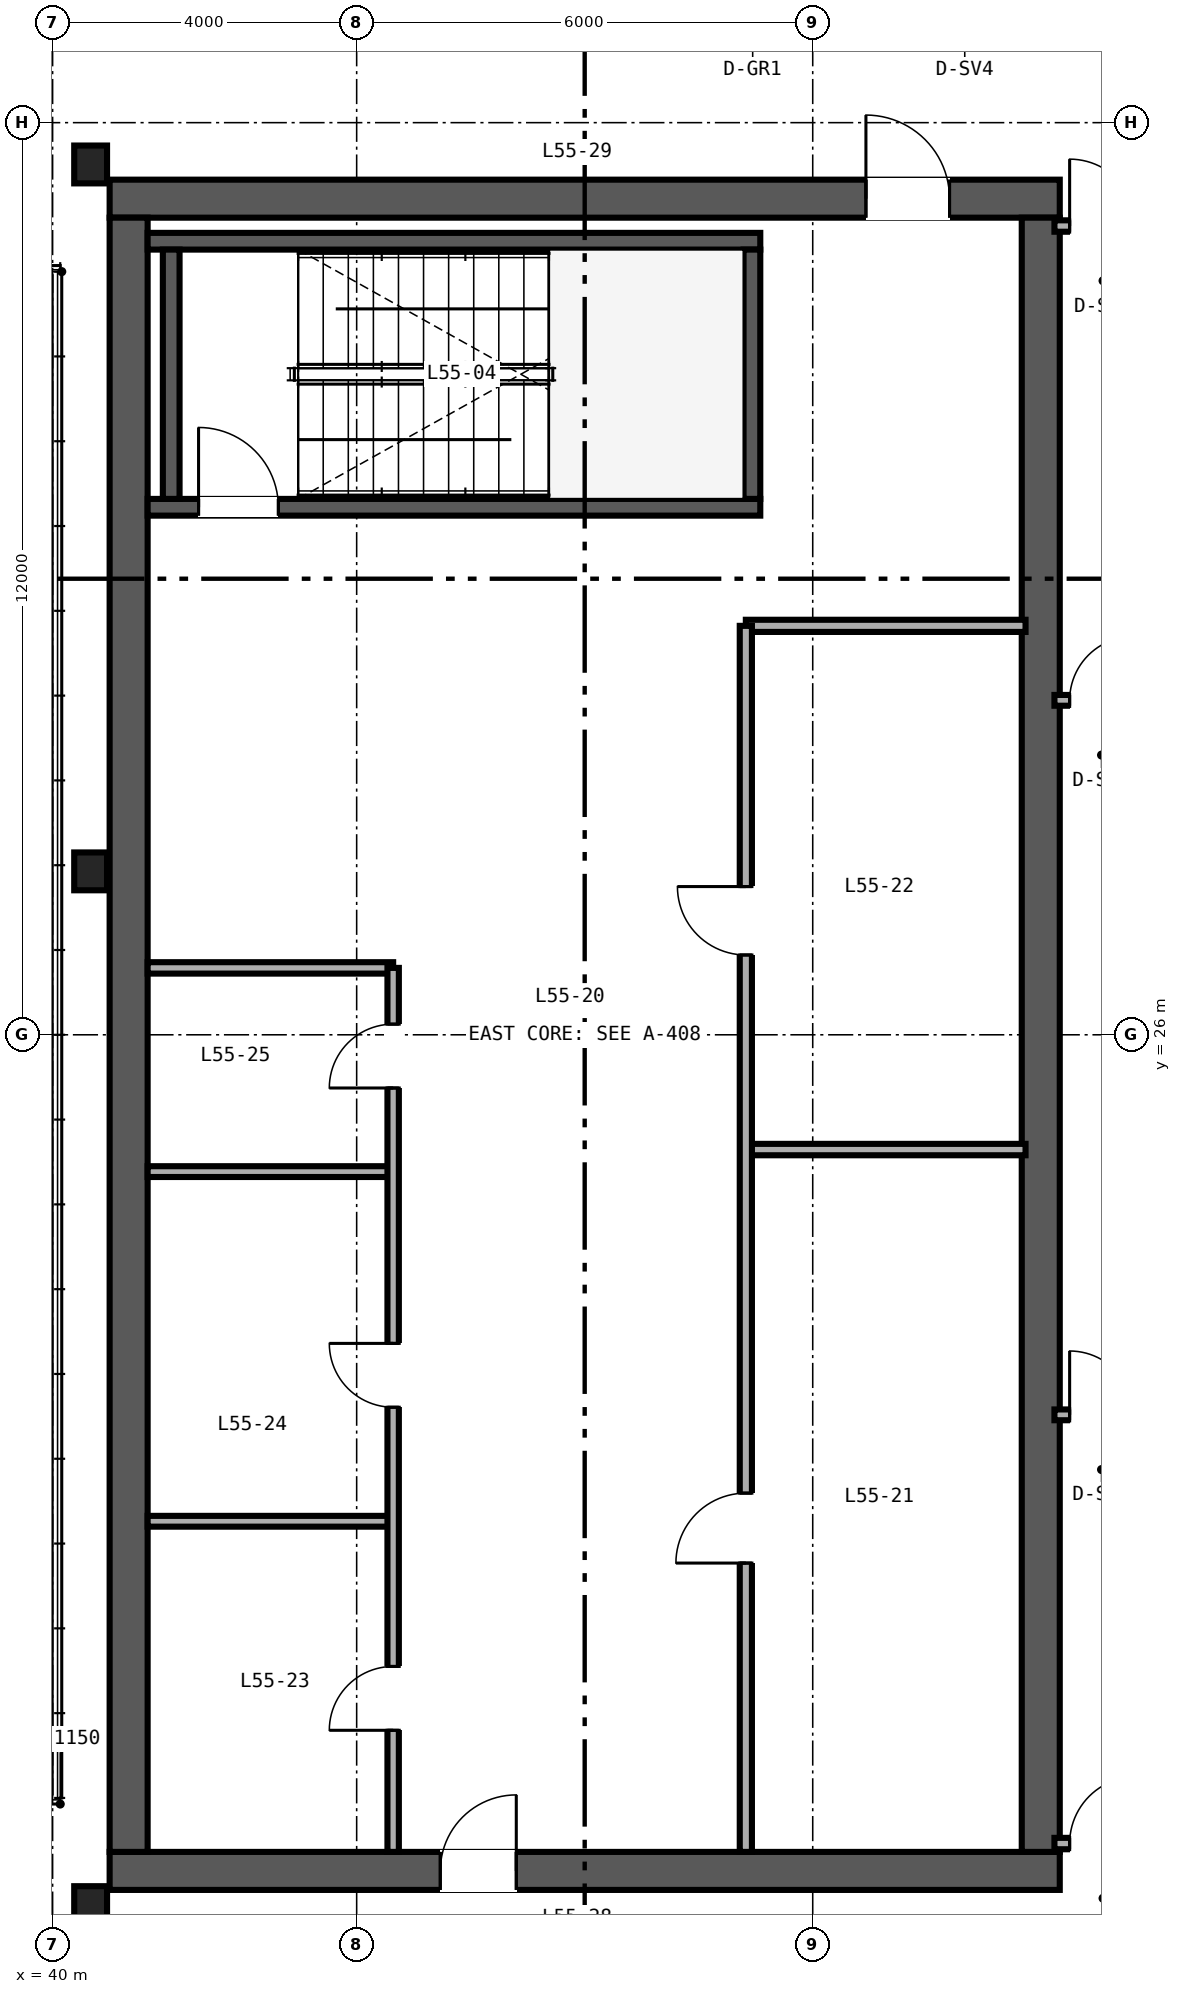
"""IFC4 building model, lengths in metres.
Left out: names, types, materials, properties, quantities, classifications, styles, units other than length and angle.
Written with IfcOpenShell. Run it as: python <this file> out.ifc"""

import sys

from ifc_helpers import new_model, si_unit, direction, frame, frame_2d, origin, origin_2d, place, context, subcontext, project, spatial, rectangle, i_section, extrude, source, transform, mapped, element, fill, save


model = new_model("IFC4")
c1 = context("Model", 3, precision=1e-05, world=origin(), true_north=direction((0.0, 1.0)))
c2 = subcontext(c1, "Body", "Model", "MODEL_VIEW")
j1 = project(units=[si_unit("LENGTHUNIT", "METRE"), si_unit("PLANEANGLEUNIT", "RADIAN")], contexts=[c1])
p1 = place(None, origin())
s1 = spatial("IfcSite", under=j1, at=p1, CompositionType="ELEMENT")
p2 = place(p1, origin())
s2 = spatial("IfcBuilding", under=s1, at=p2, CompositionType="ELEMENT")
p3 = place(p2, frame((0.0, 0.0, 217.2)))
s3 = spatial("IfcBuildingStorey", under=s2, at=p3, CompositionType="ELEMENT", Elevation=217.2)
p4 = place(p3, frame((40.75, 15.0, 0.0), z_axis=(0.0, 0.0, 1.0), x_axis=(1.0, 0.0, 0.0)))
e1 = element("IfcWall", 1, at=p4, inside=s3, PredefinedType="SHEAR", context=c2, shape_type="SweptSolid", body=[
    extrude(rectangle(XDim=12.5, YDim=0.5, at=frame_2d((6.25, 0.0))), origin(), (0.0, 0.0, 1.0), 3.28),
])
p5 = place(p4, frame((4.35, 0.0, 0.0)))
e2 = element("IfcOpeningElement", 2, at=p5, cuts=e1, PredefinedType="OPENING", context=c2, shape_type="SweptSolid", body=[
    extrude(rectangle(XDim=1.0, YDim=2.15, at=frame_2d((0.5, 1.075))), frame((0.0, 0.26, 0.0), z_axis=(0.0, -1.0, 0.0), x_axis=(1.0, 0.0, 0.0)), (0.0, 0.0, 1.0), 0.52),
])
p6 = place(p3, frame((40.75, 37.0, 0.0), z_axis=(0.0, 0.0, 1.0), x_axis=(1.0, 0.0, 0.0)))
e3 = element("IfcWall", 3, at=p6, inside=s3, PredefinedType="SHEAR", context=c2, shape_type="SweptSolid", body=[
    extrude(rectangle(XDim=12.5, YDim=0.5, at=frame_2d((6.25, 0.0))), origin(), (0.0, 0.0, 1.0), 3.28),
])
p7 = place(p6, frame((9.95, 0.0, 0.0)))
e4 = element("IfcOpeningElement", 4, at=p7, cuts=e3, PredefinedType="OPENING", context=c2, shape_type="SweptSolid", body=[
    extrude(rectangle(XDim=1.1, YDim=2.15, at=frame_2d((0.55, 1.075))), frame((0.0, 0.26, 0.0), z_axis=(0.0, -1.0, 0.0), x_axis=(1.0, 0.0, 0.0)), (0.0, 0.0, 1.0), 0.52),
])
for number, where, z_axis, x_axis in (
    (5, (41.0, 15.25, 0.0), (0.0, 0.0, 1.0), (0.0, 1.0, 0.0)),
    (6, (53.0, 15.25, 0.0), (0.0, 0.0, 1.0), (0.0, 1.0, 0.0)),
):
    element("IfcWall", number, at=place(p3, frame(where, z_axis=z_axis, x_axis=x_axis)), inside=s3, PredefinedType="SHEAR", context=c2, shape_type="SweptSolid", body=[
        extrude(rectangle(XDim=21.5, YDim=0.5, at=frame_2d((10.75, 0.0))), origin(), (0.0, 0.0, 1.0), 3.28),
    ])
p8 = place(p3, frame((41.25, 32.94, 0.0), z_axis=(0.0, 0.0, 1.0), x_axis=(1.0, 0.0, 0.0)))
e7 = element("IfcWall", 7, at=p8, inside=s3, PredefinedType="SHEAR", context=c2, shape_type="SweptSolid", body=[
    extrude(rectangle(XDim=8.06, YDim=0.22, at=frame_2d((4.03, 0.0))), origin(), (0.0, 0.0, 1.0), 3.4),
])
p9 = place(p8, frame((0.67, 0.0, 0.0)))
e8 = element("IfcOpeningElement", 8, at=p9, cuts=e7, PredefinedType="OPENING", context=c2, shape_type="SweptSolid", body=[
    extrude(rectangle(XDim=1.05, YDim=2.15, at=frame_2d((0.525, 1.075))), frame((0.0, 0.12, 0.0), z_axis=(0.0, -1.0, 0.0), x_axis=(1.0, 0.0, 0.0)), (0.0, 0.0, 1.0), 0.24),
])
p10 = place(p3, frame((41.25, 36.44, 0.0), z_axis=(0.0, 0.0, 1.0), x_axis=(1.0, 0.0, 0.0)))
e9 = element("IfcWall", 9, at=p10, inside=s3, PredefinedType="SHEAR", context=c2, shape_type="SweptSolid", body=[
    extrude(rectangle(XDim=8.06, YDim=0.22, at=frame_2d((4.03, 0.0))), origin(), (0.0, 0.0, 1.0), 3.4),
])
for number, where, z_axis, x_axis in (
    (10, (41.56, 33.05, 0.0), (0.0, 0.0, 1.0), (0.0, 1.0, 0.0)),
    (11, (49.2, 33.05, 0.0), (0.0, 0.0, 1.0), (0.0, 1.0, 0.0)),
):
    element("IfcWall", number, at=place(p3, frame(where, z_axis=z_axis, x_axis=x_axis)), inside=s3, PredefinedType="SHEAR", context=c2, shape_type="SweptSolid", body=[
        extrude(rectangle(XDim=3.28, YDim=0.22, at=frame_2d((1.64, 0.0))), origin(), (0.0, 0.0, 1.0), 3.4),
    ])
m1 = source(origin(), c2, "Body", "SweptSolid", [
    extrude(i_section(OverallWidth=0.432, OverallDepth=0.498, WebThickness=0.056, FlangeThickness=0.089, FilletRadius=0.025, at=origin_2d()), origin(), (0.0, 0.0, 1.0), 3.28),
])
for number, where, z_axis, x_axis in (
    (12, (40.5, 14.55, 0.0), (0.0, 0.0, 1.0), (1.0, 0.0, 0.0)),
    (13, (40.5, 28.15, 0.0), (0.0, 0.0, 1.0), (1.0, 0.0, 0.0)),
    (14, (40.5, 37.45, 0.0), (0.0, 0.0, 1.0), (1.0, 0.0, 0.0)),
):
    element("IfcColumn", number, at=place(p3, frame(where, z_axis=z_axis, x_axis=x_axis)), inside=s3, PredefinedType="COLUMN", context=c2, shape_type="MappedRepresentation", body=[
        mapped(m1, transform((0.0, 0.0, 0.0), scale=1.0)),
    ])
p11 = place(p3, frame((49.12, 31.38, 0.0), z_axis=(0.0, 0.0, 1.0), x_axis=(1.0, 0.0, 0.0)))
e15 = element("IfcWall", 15, at=p11, inside=s3, PredefinedType="PARTITIONING", context=c2, shape_type="SweptSolid", body=[
    extrude(rectangle(XDim=3.68, YDim=0.16, at=frame_2d((1.84, 0.0))), origin(), (0.0, 0.0, 1.0), 2.38),
])
p12 = place(p3, frame((49.12, 24.49, 0.0), z_axis=(0.0, 0.0, 1.0), x_axis=(1.0, 0.0, 0.0)))
e16 = element("IfcWall", 16, at=p12, inside=s3, PredefinedType="PARTITIONING", context=c2, shape_type="SweptSolid", body=[
    extrude(rectangle(XDim=3.68, YDim=0.15, at=frame_2d((1.84, 0.0))), origin(), (0.0, 0.0, 1.0), 3.28),
])
p13 = place(p3, frame((49.12, 15.25, 0.0), z_axis=(0.0, 0.0, 1.0), x_axis=(0.0, 1.0, 0.0)))
e17 = element("IfcWall", 17, at=p13, inside=s3, PredefinedType="PARTITIONING", context=c2, shape_type="SweptSolid", body=[
    extrude(rectangle(XDim=16.13, YDim=0.16, at=frame_2d((8.065, 0.0))), origin(), (0.0, 0.0, 1.0), 2.36),
])
p14 = place(p13, frame((3.8, 0.0, 0.0)))
e18 = element("IfcOpeningElement", 18, at=p14, cuts=e17, PredefinedType="OPENING", context=c2, shape_type="SweptSolid", body=[
    extrude(rectangle(XDim=0.92, YDim=2.15, at=frame_2d((0.46, 1.075))), frame((0.0, 0.09, 0.0), z_axis=(0.0, -1.0, 0.0), x_axis=(1.0, 0.0, 0.0)), (0.0, 0.0, 1.0), 0.18),
])
p15 = place(p13, frame((11.8, 0.0, 0.0)))
e19 = element("IfcOpeningElement", 19, at=p15, cuts=e17, PredefinedType="OPENING", context=c2, shape_type="SweptSolid", body=[
    extrude(rectangle(XDim=0.9, YDim=2.15, at=frame_2d((0.45, 1.075))), frame((0.0, 0.09, 0.0), z_axis=(0.0, -1.0, 0.0), x_axis=(1.0, 0.0, 0.0)), (0.0, 0.0, 1.0), 0.18),
])
p16 = place(p3, frame((41.25, 26.88, 0.0), z_axis=(0.0, 0.0, 1.0), x_axis=(1.0, 0.0, 0.0)))
e20 = element("IfcWall", 20, at=p16, inside=s3, PredefinedType="PARTITIONING", context=c2, shape_type="SweptSolid", body=[
    extrude(rectangle(XDim=3.23, YDim=0.15, at=frame_2d((1.615, 0.0))), origin(), (0.0, 0.0, 1.0), 3.28),
])
for number, where, z_axis, x_axis in (
    (21, (41.25, 19.6, 0.0), (0.0, 0.0, 1.0), (1.0, 0.0, 0.0)),
    (22, (41.25, 24.2, 0.0), (0.0, 0.0, 1.0), (1.0, 0.0, 0.0)),
):
    element("IfcWall", number, at=place(p3, frame(where, z_axis=z_axis, x_axis=x_axis)), inside=s3, PredefinedType="PARTITIONING", context=c2, shape_type="SweptSolid", body=[
        extrude(rectangle(XDim=3.23, YDim=0.142, at=frame_2d((1.615, 0.0))), origin(), (0.0, 0.0, 1.0), 3.28),
    ])
p17 = place(p3, frame((44.48, 15.25, 0.0), z_axis=(0.0, 0.0, 1.0), x_axis=(0.0, 1.0, 0.0)))
e23 = element("IfcWall", 23, at=p17, inside=s3, PredefinedType="PARTITIONING", context=c2, shape_type="SweptSolid", body=[
    extrude(rectangle(XDim=11.63, YDim=0.15, at=frame_2d((5.815, 0.0))), origin(), (0.0, 0.0, 1.0), 3.28),
])
p18 = place(p17, frame((1.6, 0.0, 0.0)))
e24 = element("IfcOpeningElement", 24, at=p18, cuts=e23, PredefinedType="OPENING", context=c2, shape_type="SweptSolid", body=[
    extrude(rectangle(XDim=0.84, YDim=2.1, at=frame_2d((0.42, 1.05))), frame((0.0, 0.085, 0.0), z_axis=(0.0, -1.0, 0.0), x_axis=(1.0, 0.0, 0.0)), (0.0, 0.0, 1.0), 0.17),
])
p19 = place(p17, frame((5.85, 0.0, 0.0)))
e25 = element("IfcOpeningElement", 25, at=p19, cuts=e23, PredefinedType="OPENING", context=c2, shape_type="SweptSolid", body=[
    extrude(rectangle(XDim=0.84, YDim=2.1, at=frame_2d((0.42, 1.05))), frame((0.0, 0.085, 0.0), z_axis=(0.0, -1.0, 0.0), x_axis=(1.0, 0.0, 0.0)), (0.0, 0.0, 1.0), 0.17),
])
p20 = place(p17, frame((10.05, 0.0, 0.0)))
e26 = element("IfcOpeningElement", 26, at=p20, cuts=e23, PredefinedType="OPENING", context=c2, shape_type="SweptSolid", body=[
    extrude(rectangle(XDim=0.84, YDim=2.1, at=frame_2d((0.42, 1.05))), frame((0.0, 0.085, 0.0), z_axis=(0.0, -1.0, 0.0), x_axis=(1.0, 0.0, 0.0)), (0.0, 0.0, 1.0), 0.17),
])
p21 = place(p3, frame((53.18, 15.36, 0.0), z_axis=(0.0, 0.0, 1.0), x_axis=(1.0, 0.0, 0.0)))
e27 = element("IfcWall", 27, at=p21, inside=s3, PredefinedType="PARTITIONING", context=c2, shape_type="SweptSolid", body=[
    extrude(rectangle(XDim=2.66, YDim=0.15, at=frame_2d((1.33, 0.0))), origin(), (0.0, 0.0, 1.0), 2.501),
])
p22 = place(p21, frame((0.2, 0.0, 0.0)))
e28 = element("IfcOpeningElement", 28, at=p22, cuts=e27, PredefinedType="OPENING", context=c2, shape_type="SweptSolid", body=[
    extrude(rectangle(XDim=0.88, YDim=2.15, at=frame_2d((0.44, 1.075))), frame((0.0, 0.085, 0.0), z_axis=(0.0, -1.0, 0.0), x_axis=(1.0, 0.0, 0.0)), (0.0, 0.0, 1.0), 0.17),
])
p23 = place(p3, frame((53.18, 36.64, 0.0), z_axis=(0.0, 0.0, 1.0), x_axis=(1.0, 0.0, 0.0)))
e29 = element("IfcWall", 29, at=p23, inside=s3, PredefinedType="PARTITIONING", context=c2, shape_type="SweptSolid", body=[
    extrude(rectangle(XDim=2.66, YDim=0.15, at=frame_2d((1.33, 0.0))), origin(), (0.0, 0.0, 1.0), 2.663),
])
p24 = place(p23, frame((0.2, 0.0, 0.0)))
e30 = element("IfcOpeningElement", 30, at=p24, cuts=e29, PredefinedType="OPENING", context=c2, shape_type="SweptSolid", body=[
    extrude(rectangle(XDim=0.88, YDim=2.15, at=frame_2d((0.44, 1.075))), frame((0.0, 0.085, 0.0), z_axis=(0.0, -1.0, 0.0), x_axis=(1.0, 0.0, 0.0)), (0.0, 0.0, 1.0), 0.17),
])
p25 = place(p3, frame((53.18, 21.0, 0.0), z_axis=(0.0, 0.0, 1.0), x_axis=(1.0, 0.0, 0.0)))
e31 = element("IfcWall", 31, at=p25, inside=s3, PredefinedType="PARTITIONING", context=c2, shape_type="SweptSolid", body=[
    extrude(rectangle(XDim=2.66, YDim=0.142, at=frame_2d((1.33, 0.0))), origin(), (0.0, 0.0, 1.0), 2.501),
])
p26 = place(p25, frame((0.2, 0.0, 0.0)))
e32 = element("IfcOpeningElement", 32, at=p26, cuts=e31, PredefinedType="OPENING", context=c2, shape_type="SweptSolid", body=[
    extrude(rectangle(XDim=0.84, YDim=2.1, at=frame_2d((0.42, 1.05))), frame((0.0, 0.081, 0.0), z_axis=(0.0, -1.0, 0.0), x_axis=(1.0, 0.0, 0.0)), (0.0, 0.0, 1.0), 0.162),
])
p27 = place(p3, frame((53.18, 30.4, 0.0), z_axis=(0.0, 0.0, 1.0), x_axis=(1.0, 0.0, 0.0)))
e33 = element("IfcWall", 33, at=p27, inside=s3, PredefinedType="PARTITIONING", context=c2, shape_type="SweptSolid", body=[
    extrude(rectangle(XDim=2.66, YDim=0.142, at=frame_2d((1.33, 0.0))), origin(), (0.0, 0.0, 1.0), 2.663),
])
p28 = place(p27, frame((0.2, 0.0, 0.0)))
e34 = element("IfcOpeningElement", 34, at=p28, cuts=e33, PredefinedType="OPENING", context=c2, shape_type="SweptSolid", body=[
    extrude(rectangle(XDim=0.84, YDim=2.1, at=frame_2d((0.42, 1.05))), frame((0.0, 0.081, 0.0), z_axis=(0.0, -1.0, 0.0), x_axis=(1.0, 0.0, 0.0)), (0.0, 0.0, 1.0), 0.162),
])
m2 = source(origin(), c2, "Body", "SweptSolid", [
    extrude(rectangle(XDim=1.05, YDim=2.15, at=frame_2d((0.525, 1.075))), frame((0.0, 0.025, 0.0), z_axis=(0.0, -1.0, 0.0), x_axis=(1.0, 0.0, 0.0)), (0.0, 0.0, 1.0), 0.05),
])
p29 = place(p9, origin())
e35 = element("IfcDoor", 35, at=p29, inside=s3, OperationType="SINGLE_SWING_LEFT", PredefinedType="DOOR", context=c2, shape_type="MappedRepresentation", body=[
    mapped(m2, transform((0.0, 0.0, 0.0), scale=1.0)),
])
fill(e8, e35)
m3 = source(origin(), c2, "Body", "SweptSolid", [
    extrude(rectangle(XDim=1.0, YDim=2.15, at=frame_2d((0.5, 1.075))), frame((0.0, 0.025, 0.0), z_axis=(0.0, -1.0, 0.0), x_axis=(1.0, 0.0, 0.0)), (0.0, 0.0, 1.0), 0.05),
])
p30 = place(p5, origin())
e36 = element("IfcDoor", 36, at=p30, inside=s3, OperationType="SINGLE_SWING_RIGHT", PredefinedType="DOOR", context=c2, shape_type="MappedRepresentation", body=[
    mapped(m3, transform((0.0, 0.0, 0.0), scale=1.0)),
])
fill(e2, e36)
m4 = source(origin(), c2, "Body", "SweptSolid", [
    extrude(rectangle(XDim=1.1, YDim=2.15, at=frame_2d((0.55, 1.075))), frame((0.0, 0.025, 0.0), z_axis=(0.0, -1.0, 0.0), x_axis=(1.0, 0.0, 0.0)), (0.0, 0.0, 1.0), 0.05),
])
p31 = place(p7, origin())
e37 = element("IfcDoor", 37, at=p31, inside=s3, OperationType="SINGLE_SWING_LEFT", PredefinedType="DOOR", context=c2, shape_type="MappedRepresentation", body=[
    mapped(m4, transform((0.0, 0.0, 0.0), scale=1.0)),
])
fill(e4, e37)
m5 = source(origin(), c2, "Body", "SweptSolid", [
    extrude(rectangle(XDim=0.92, YDim=2.15, at=frame_2d((0.46, 1.075))), frame((0.0, 0.025, 0.0), z_axis=(0.0, -1.0, 0.0), x_axis=(1.0, 0.0, 0.0)), (0.0, 0.0, 1.0), 0.05),
])
p32 = place(p14, origin())
e38 = element("IfcDoor", 38, at=p32, inside=s3, OperationType="SINGLE_SWING_LEFT", PredefinedType="DOOR", context=c2, shape_type="MappedRepresentation", body=[
    mapped(m5, transform((0.0, 0.0, 0.0), scale=1.0)),
])
fill(e18, e38)
m6 = source(origin(), c2, "Body", "SweptSolid", [
    extrude(rectangle(XDim=0.9, YDim=2.15, at=frame_2d((0.45, 1.075))), frame((0.0, 0.025, 0.0), z_axis=(0.0, -1.0, 0.0), x_axis=(1.0, 0.0, 0.0)), (0.0, 0.0, 1.0), 0.05),
])
p33 = place(p15, origin())
e39 = element("IfcDoor", 39, at=p33, inside=s3, OperationType="SINGLE_SWING_RIGHT", PredefinedType="DOOR", context=c2, shape_type="MappedRepresentation", body=[
    mapped(m6, transform((0.0, 0.0, 0.0), scale=1.0)),
])
fill(e19, e39)
m7 = source(origin(), c2, "Body", "SweptSolid", [
    extrude(rectangle(XDim=0.84, YDim=2.1, at=frame_2d((0.42, 1.05))), frame((0.0, 0.025, 0.0), z_axis=(0.0, -1.0, 0.0), x_axis=(1.0, 0.0, 0.0)), (0.0, 0.0, 1.0), 0.05),
])
p34 = place(p18, origin())
e40 = element("IfcDoor", 40, at=p34, inside=s3, OperationType="SINGLE_SWING_LEFT", PredefinedType="DOOR", context=c2, shape_type="MappedRepresentation", body=[
    mapped(m7, transform((0.0, 0.0, 0.0), scale=1.0)),
])
fill(e24, e40)
p35 = place(p19, origin())
e41 = element("IfcDoor", 41, at=p35, inside=s3, OperationType="SINGLE_SWING_RIGHT", PredefinedType="DOOR", context=c2, shape_type="MappedRepresentation", body=[
    mapped(m7, transform((0.0, 0.0, 0.0), scale=1.0)),
])
fill(e25, e41)
p36 = place(p20, origin())
e42 = element("IfcDoor", 42, at=p36, inside=s3, OperationType="SINGLE_SWING_LEFT", PredefinedType="DOOR", context=c2, shape_type="MappedRepresentation", body=[
    mapped(m7, transform((0.0, 0.0, 0.0), scale=1.0)),
])
fill(e26, e42)
m8 = source(origin(), c2, "Body", "SweptSolid", [
    extrude(rectangle(XDim=0.88, YDim=2.15, at=frame_2d((0.44, 1.075))), frame((0.0, 0.025, 0.0), z_axis=(0.0, -1.0, 0.0), x_axis=(1.0, 0.0, 0.0)), (0.0, 0.0, 1.0), 0.05),
])
p37 = place(p22, origin())
e43 = element("IfcDoor", 43, at=p37, inside=s3, OperationType="SINGLE_SWING_RIGHT", PredefinedType="DOOR", context=c2, shape_type="MappedRepresentation", body=[
    mapped(m8, transform((0.0, 0.0, 0.0), scale=1.0)),
])
fill(e28, e43)
p38 = place(p24, origin())
e44 = element("IfcDoor", 44, at=p38, inside=s3, OperationType="SINGLE_SWING_LEFT", PredefinedType="DOOR", context=c2, shape_type="MappedRepresentation", body=[
    mapped(m8, transform((0.0, 0.0, 0.0), scale=1.0)),
])
fill(e30, e44)
p39 = place(p26, origin())
e45 = element("IfcDoor", 45, at=p39, inside=s3, OperationType="SINGLE_SWING_LEFT", PredefinedType="DOOR", context=c2, shape_type="MappedRepresentation", body=[
    mapped(m7, transform((0.0, 0.0, 0.0), scale=1.0)),
])
fill(e32, e45)
p40 = place(p28, origin())
e46 = element("IfcDoor", 46, at=p40, inside=s3, OperationType="SINGLE_SWING_RIGHT", PredefinedType="DOOR", context=c2, shape_type="MappedRepresentation", body=[
    mapped(m7, transform((0.0, 0.0, 0.0), scale=1.0)),
])
fill(e34, e46)
save(model, sys.argv[1])
